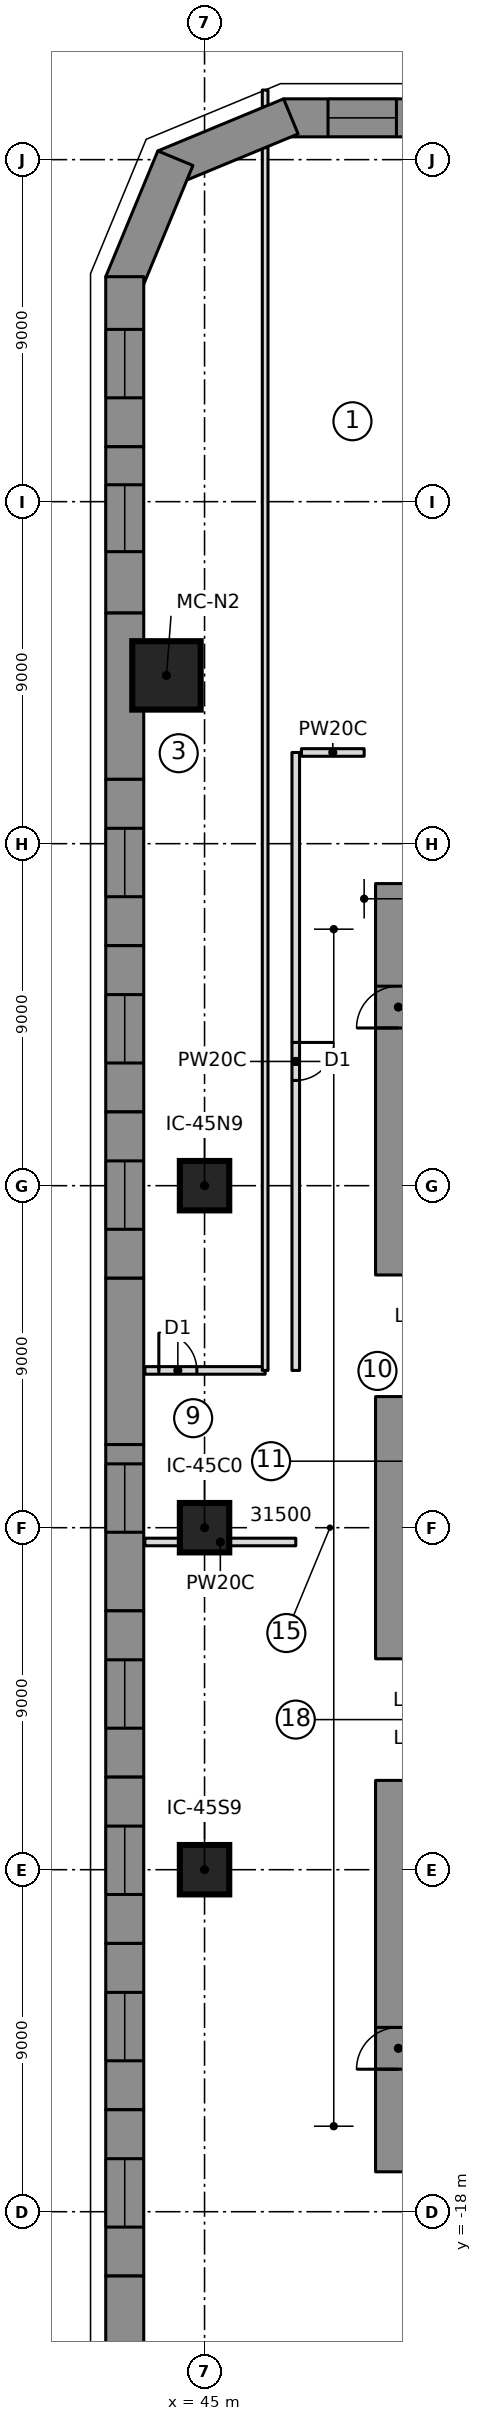
"""IFC4 building model, lengths in metres.
Left out: names, types, materials, properties, quantities, classifications, styles, units other than length and angle.
Written with IfcOpenShell. Run it as: python <this file> out.ifc"""

import sys

from ifc_helpers import new_model, si_unit, direction, frame, frame_2d, origin, origin_2d, place, context, subcontext, project, spatial, polyline, rectangle, outline, extrude, element, fill, save


model = new_model("IFC4")
c1 = context("Model", 3, precision=1e-05, world=origin(), true_north=direction((0.0, 1.0)))
c2 = subcontext(c1, "Body", "Model", "MODEL_VIEW")
j1 = project(units=[si_unit("LENGTHUNIT", "METRE"), si_unit("PLANEANGLEUNIT", "RADIAN")], contexts=[c1])
p1 = place(None, origin())
s1 = spatial("IfcSite", under=j1, at=p1, CompositionType="ELEMENT")
p2 = place(p1, origin())
s2 = spatial("IfcBuilding", under=s1, at=p2, CompositionType="ELEMENT")
p3 = place(p2, frame((0.0, 0.0, 19.0)))
s3 = spatial("IfcBuildingStorey", under=s2, at=p3, CompositionType="ELEMENT", Elevation=19.0)
p4 = place(p3, frame((50.1, 6.65, 0.0), z_axis=(0.0, 0.0, 1.0), x_axis=(0.0, 1.0, 0.0)))
e1 = element("IfcWall", 1, at=p4, inside=s3, PredefinedType="SHEAR", context=c2, shape_type="SweptSolid", body=[
    extrude(rectangle(XDim=10.3, YDim=1.2, at=frame_2d((5.15, 0.0))), origin(), (0.0, 0.0, 1.0), 5.0),
])
p5 = place(p4, frame((6.5, 0.0, 0.0)))
e2 = element("IfcOpeningElement", 2, at=p5, cuts=e1, PredefinedType="OPENING", context=c2, shape_type="SweptSolid", body=[
    extrude(rectangle(XDim=1.1, YDim=2.1, at=frame_2d((0.55, 1.05))), frame((0.0, 0.61, 0.0), z_axis=(0.0, -1.0, 0.0), x_axis=(1.0, 0.0, 0.0)), (0.0, 0.0, 1.0), 1.22),
])
p6 = place(p3, frame((50.1, -3.45, 0.0), z_axis=(0.0, 0.0, 1.0), x_axis=(0.0, 1.0, 0.0)))
e3 = element("IfcWall", 3, at=p6, inside=s3, PredefinedType="SHEAR", context=c2, shape_type="SweptSolid", body=[
    extrude(rectangle(XDim=6.9, YDim=1.2, at=frame_2d((3.45, 0.0))), origin(), (0.0, 0.0, 1.0), 5.0),
])
p7 = place(p3, frame((50.1, -16.95, 0.0), z_axis=(0.0, 0.0, 1.0), x_axis=(0.0, 1.0, 0.0)))
e4 = element("IfcWall", 4, at=p7, inside=s3, PredefinedType="SHEAR", context=c2, shape_type="SweptSolid", body=[
    extrude(rectangle(XDim=10.3, YDim=1.2, at=frame_2d((5.15, 0.0))), origin(), (0.0, 0.0, 1.0), 5.0),
])
p8 = place(p7, frame((2.7, 0.0, 0.0)))
e5 = element("IfcOpeningElement", 5, at=p8, cuts=e4, PredefinedType="OPENING", context=c2, shape_type="SweptSolid", body=[
    extrude(rectangle(XDim=1.1, YDim=2.1, at=frame_2d((0.55, 1.05))), frame((0.0, 0.61, 0.0), z_axis=(0.0, -1.0, 0.0), x_axis=(1.0, 0.0, 0.0)), (0.0, 0.0, 1.0), 1.22),
])
p9 = place(p3, frame((43.998, 22.428, 0.0), z_axis=(0.0, 0.0, 1.0), x_axis=(1.0, 0.0, 0.0)))
e6 = element("IfcColumn", 6, at=p9, inside=s3, PredefinedType="COLUMN", context=c2, shape_type="SweptSolid", body=[
    extrude(rectangle(XDim=1.8, YDim=1.8, at=origin_2d()), origin(), (0.0, 0.0, 1.0), 5.0),
])
for number, where, z_axis, x_axis in (
    (7, (45.0, -9.0, 0.0), (0.0, 0.0, 1.0), (1.0, 0.0, 0.0)),
    (8, (45.0, 0.0, 0.0), (0.0, 0.0, 1.0), (1.0, 0.0, 0.0)),
    (9, (45.0, 9.0, 0.0), (0.0, 0.0, 1.0), (1.0, 0.0, 0.0)),
):
    element("IfcColumn", number, at=place(p3, frame(where, z_axis=z_axis, x_axis=x_axis)), inside=s3, PredefinedType="COLUMN", context=c2, shape_type="SweptSolid", body=[
        extrude(rectangle(XDim=1.3, YDim=1.3, at=origin_2d()), origin(), (0.0, 0.0, 1.0), 5.0),
    ])
p10 = place(p3, frame((51.119, 37.1, 0.0), z_axis=(0.0, 0.0, 1.0), x_axis=(-1.0, 0.0, 0.0)))
e10 = element("IfcWall", 10, at=p10, inside=s3, PredefinedType="NOTDEFINED", context=c2, shape_type="SweptSolid", body=[
    extrude(outline(polyline([(0.0, -0.5), (4.04, -0.5), (3.841, 0.5), (0.0, 0.5), (0.0, -0.5)])), origin(), (0.0, 0.0, 1.0), 4.7),
])
p11 = place(p10, frame((1.07, 0.0, 0.9)))
e11 = element("IfcOpeningElement", 11, at=p11, cuts=e10, PredefinedType="OPENING", context=c2, shape_type="SweptSolid", body=[
    extrude(rectangle(XDim=1.8, YDim=2.4, at=frame_2d((0.9, 1.2))), frame((0.0, 0.51, 0.0), z_axis=(0.0, -1.0, 0.0), x_axis=(1.0, 0.0, 0.0)), (0.0, 0.0, 1.0), 1.02),
])
p12 = place(p3, frame((47.179, 37.1, 0.0), z_axis=(0.0, 0.0, 1.0), x_axis=(-0.923862365102, -0.382724875529, 0.0)))
e12 = element("IfcWall", 12, at=p12, inside=s3, PredefinedType="NOTDEFINED", context=c2, shape_type="SweptSolid", body=[
    extrude(outline(polyline([(-0.1, -0.5), (3.482, -0.5), (3.068, 0.5), (0.1, 0.5), (-0.1, -0.5)])), origin(), (0.0, 0.0, 1.0), 4.7),
])
p13 = place(p3, frame((44.153, 35.847, 0.0), z_axis=(0.0, 0.0, 1.0), x_axis=(-0.382724875529, -0.923862365102, 0.0)))
e13 = element("IfcWall", 13, at=p13, inside=s3, PredefinedType="NOTDEFINED", context=c2, shape_type="SweptSolid", body=[
    extrude(outline(polyline([(-0.207, -0.5), (3.375, -0.5), (3.175, 0.5), (0.207, 0.5), (-0.207, -0.5)])), origin(), (0.0, 0.0, 1.0), 4.7),
])
p14 = place(p3, frame((42.9, 32.821, 0.0), z_axis=(0.0, 0.0, 1.0), x_axis=(0.0, -1.0, 0.0)))
e14 = element("IfcWall", 14, at=p14, inside=s3, PredefinedType="NOTDEFINED", context=c2, shape_type="SweptSolid", body=[
    extrude(outline(polyline([(-0.1, -0.5), (4.376, -0.5), (4.376, 0.5), (0.1, 0.5), (-0.1, -0.5)])), origin(), (0.0, 0.0, 1.0), 4.7),
])
p15 = place(p14, frame((1.288, 0.0, 0.9)))
e15 = element("IfcOpeningElement", 15, at=p15, cuts=e14, PredefinedType="OPENING", context=c2, shape_type="SweptSolid", body=[
    extrude(rectangle(XDim=1.8, YDim=2.4, at=frame_2d((0.9, 1.2))), frame((0.0, 0.51, 0.0), z_axis=(0.0, -1.0, 0.0), x_axis=(1.0, 0.0, 0.0)), (0.0, 0.0, 1.0), 1.02),
])
p16 = place(p3, frame((42.9, 28.445, 0.0), z_axis=(0.0, 0.0, 1.0), x_axis=(0.0, -1.0, 0.0)))
e16 = element("IfcWall", 16, at=p16, inside=s3, PredefinedType="NOTDEFINED", context=c2, shape_type="SweptSolid", body=[
    extrude(outline(polyline([(0.0, -0.5), (4.376, -0.5), (4.376, 0.5), (0.0, 0.5), (0.0, -0.5)])), origin(), (0.0, 0.0, 1.0), 4.7),
])
p17 = place(p16, frame((1.0, 0.0, 0.9)))
e17 = element("IfcOpeningElement", 17, at=p17, cuts=e16, PredefinedType="OPENING", context=c2, shape_type="SweptSolid", body=[
    extrude(rectangle(XDim=1.76, YDim=2.4, at=frame_2d((0.88, 1.2))), frame((0.0, 0.51, 0.0), z_axis=(0.0, -1.0, 0.0), x_axis=(1.0, 0.0, 0.0)), (0.0, 0.0, 1.0), 1.02),
])
p18 = place(p3, frame((42.9, 24.069, 0.0), z_axis=(0.0, 0.0, 1.0), x_axis=(0.0, -1.0, 0.0)))
e18 = element("IfcWall", 18, at=p18, inside=s3, PredefinedType="NOTDEFINED", context=c2, shape_type="SweptSolid", body=[
    extrude(outline(polyline([(0.0, -0.5), (4.376, -0.5), (4.376, 0.5), (0.0, 0.5), (0.0, -0.5)])), origin(), (0.0, 0.0, 1.0), 4.7),
])
p19 = place(p3, frame((42.9, 19.693, 0.0), z_axis=(0.0, 0.0, 1.0), x_axis=(0.0, -1.0, 0.0)))
e19 = element("IfcWall", 19, at=p19, inside=s3, PredefinedType="NOTDEFINED", context=c2, shape_type="SweptSolid", body=[
    extrude(outline(polyline([(0.0, -0.5), (4.376, -0.5), (4.376, 0.5), (0.0, 0.5), (0.0, -0.5)])), origin(), (0.0, 0.0, 1.0), 4.7),
])
p20 = place(p19, frame((1.288, 0.0, 0.9)))
e20 = element("IfcOpeningElement", 20, at=p20, cuts=e19, PredefinedType="OPENING", context=c2, shape_type="SweptSolid", body=[
    extrude(rectangle(XDim=1.8, YDim=2.4, at=frame_2d((0.9, 1.2))), frame((0.0, 0.51, 0.0), z_axis=(0.0, -1.0, 0.0), x_axis=(1.0, 0.0, 0.0)), (0.0, 0.0, 1.0), 1.02),
])
p21 = place(p3, frame((42.9, 15.316, 0.0), z_axis=(0.0, 0.0, 1.0), x_axis=(0.0, -1.0, 0.0)))
e21 = element("IfcWall", 21, at=p21, inside=s3, PredefinedType="NOTDEFINED", context=c2, shape_type="SweptSolid", body=[
    extrude(outline(polyline([(0.0, -0.5), (4.376, -0.5), (4.376, 0.5), (0.0, 0.5), (0.0, -0.5)])), origin(), (0.0, 0.0, 1.0), 4.7),
])
p22 = place(p21, frame((1.288, 0.0, 0.9)))
e22 = element("IfcOpeningElement", 22, at=p22, cuts=e21, PredefinedType="OPENING", context=c2, shape_type="SweptSolid", body=[
    extrude(rectangle(XDim=1.8, YDim=2.4, at=frame_2d((0.9, 1.2))), frame((0.0, 0.51, 0.0), z_axis=(0.0, -1.0, 0.0), x_axis=(1.0, 0.0, 0.0)), (0.0, 0.0, 1.0), 1.02),
])
p23 = place(p3, frame((42.9, 10.94, 0.0), z_axis=(0.0, 0.0, 1.0), x_axis=(0.0, -1.0, 0.0)))
e23 = element("IfcWall", 23, at=p23, inside=s3, PredefinedType="NOTDEFINED", context=c2, shape_type="SweptSolid", body=[
    extrude(outline(polyline([(0.0, -0.5), (4.376, -0.5), (4.376, 0.5), (0.0, 0.5), (0.0, -0.5)])), origin(), (0.0, 0.0, 1.0), 4.7),
])
p24 = place(p23, frame((1.288, 0.0, 0.9)))
e24 = element("IfcOpeningElement", 24, at=p24, cuts=e23, PredefinedType="OPENING", context=c2, shape_type="SweptSolid", body=[
    extrude(rectangle(XDim=1.8, YDim=2.4, at=frame_2d((0.9, 1.2))), frame((0.0, 0.51, 0.0), z_axis=(0.0, -1.0, 0.0), x_axis=(1.0, 0.0, 0.0)), (0.0, 0.0, 1.0), 1.02),
])
p25 = place(p3, frame((42.9, 6.564, 0.0), z_axis=(0.0, 0.0, 1.0), x_axis=(0.0, -1.0, 0.0)))
e25 = element("IfcWall", 25, at=p25, inside=s3, PredefinedType="NOTDEFINED", context=c2, shape_type="SweptSolid", body=[
    extrude(outline(polyline([(0.0, -0.5), (4.376, -0.5), (4.376, 0.5), (0.0, 0.5), (0.0, -0.5)])), origin(), (0.0, 0.0, 1.0), 4.7),
])
p26 = place(p3, frame((42.9, 2.188, 0.0), z_axis=(0.0, 0.0, 1.0), x_axis=(0.0, -1.0, 0.0)))
e26 = element("IfcWall", 26, at=p26, inside=s3, PredefinedType="NOTDEFINED", context=c2, shape_type="SweptSolid", body=[
    extrude(outline(polyline([(0.0, -0.5), (4.376, -0.5), (4.376, 0.5), (0.0, 0.5), (0.0, -0.5)])), origin(), (0.0, 0.0, 1.0), 4.7),
])
p27 = place(p26, frame((0.508, 0.0, 0.9)))
e27 = element("IfcOpeningElement", 27, at=p27, cuts=e26, PredefinedType="OPENING", context=c2, shape_type="SweptSolid", body=[
    extrude(rectangle(XDim=1.8, YDim=2.4, at=frame_2d((0.9, 1.2))), frame((0.0, 0.51, 0.0), z_axis=(0.0, -1.0, 0.0), x_axis=(1.0, 0.0, 0.0)), (0.0, 0.0, 1.0), 1.02),
])
p28 = place(p3, frame((42.9, -2.188, 0.0), z_axis=(0.0, 0.0, 1.0), x_axis=(0.0, -1.0, 0.0)))
e28 = element("IfcWall", 28, at=p28, inside=s3, PredefinedType="NOTDEFINED", context=c2, shape_type="SweptSolid", body=[
    extrude(outline(polyline([(0.0, -0.5), (4.376, -0.5), (4.376, 0.5), (0.0, 0.5), (0.0, -0.5)])), origin(), (0.0, 0.0, 1.0), 4.7),
])
p29 = place(p28, frame((1.288, 0.0, 0.9)))
e29 = element("IfcOpeningElement", 29, at=p29, cuts=e28, PredefinedType="OPENING", context=c2, shape_type="SweptSolid", body=[
    extrude(rectangle(XDim=1.8, YDim=2.4, at=frame_2d((0.9, 1.2))), frame((0.0, 0.51, 0.0), z_axis=(0.0, -1.0, 0.0), x_axis=(1.0, 0.0, 0.0)), (0.0, 0.0, 1.0), 1.02),
])
p30 = place(p3, frame((42.9, -6.564, 0.0), z_axis=(0.0, 0.0, 1.0), x_axis=(0.0, -1.0, 0.0)))
e30 = element("IfcWall", 30, at=p30, inside=s3, PredefinedType="NOTDEFINED", context=c2, shape_type="SweptSolid", body=[
    extrude(outline(polyline([(0.0, -0.5), (4.376, -0.5), (4.376, 0.5), (0.0, 0.5), (0.0, -0.5)])), origin(), (0.0, 0.0, 1.0), 4.7),
])
p31 = place(p30, frame((1.288, 0.0, 0.9)))
e31 = element("IfcOpeningElement", 31, at=p31, cuts=e30, PredefinedType="OPENING", context=c2, shape_type="SweptSolid", body=[
    extrude(rectangle(XDim=1.8, YDim=2.4, at=frame_2d((0.9, 1.2))), frame((0.0, 0.51, 0.0), z_axis=(0.0, -1.0, 0.0), x_axis=(1.0, 0.0, 0.0)), (0.0, 0.0, 1.0), 1.02),
])
p32 = place(p3, frame((42.9, -10.94, 0.0), z_axis=(0.0, 0.0, 1.0), x_axis=(0.0, -1.0, 0.0)))
e32 = element("IfcWall", 32, at=p32, inside=s3, PredefinedType="NOTDEFINED", context=c2, shape_type="SweptSolid", body=[
    extrude(outline(polyline([(0.0, -0.5), (4.376, -0.5), (4.376, 0.5), (0.0, 0.5), (0.0, -0.5)])), origin(), (0.0, 0.0, 1.0), 4.7),
])
p33 = place(p32, frame((1.288, 0.0, 0.9)))
e33 = element("IfcOpeningElement", 33, at=p33, cuts=e32, PredefinedType="OPENING", context=c2, shape_type="SweptSolid", body=[
    extrude(rectangle(XDim=1.8, YDim=2.4, at=frame_2d((0.9, 1.2))), frame((0.0, 0.51, 0.0), z_axis=(0.0, -1.0, 0.0), x_axis=(1.0, 0.0, 0.0)), (0.0, 0.0, 1.0), 1.02),
])
p34 = place(p3, frame((42.9, -15.316, 0.0), z_axis=(0.0, 0.0, 1.0), x_axis=(0.0, -1.0, 0.0)))
e34 = element("IfcWall", 34, at=p34, inside=s3, PredefinedType="NOTDEFINED", context=c2, shape_type="SweptSolid", body=[
    extrude(outline(polyline([(0.0, -0.5), (4.376, -0.5), (4.376, 0.5), (0.0, 0.5), (0.0, -0.5)])), origin(), (0.0, 0.0, 1.0), 4.7),
])
p35 = place(p34, frame((1.288, 0.0, 0.9)))
e35 = element("IfcOpeningElement", 35, at=p35, cuts=e34, PredefinedType="OPENING", context=c2, shape_type="SweptSolid", body=[
    extrude(rectangle(XDim=1.8, YDim=2.4, at=frame_2d((0.9, 1.2))), frame((0.0, 0.51, 0.0), z_axis=(0.0, -1.0, 0.0), x_axis=(1.0, 0.0, 0.0)), (0.0, 0.0, 1.0), 1.02),
])
p36 = place(p3, frame((42.9, -19.693, 0.0), z_axis=(0.0, 0.0, 1.0), x_axis=(0.0, -1.0, 0.0)))
e36 = element("IfcWall", 36, at=p36, inside=s3, PredefinedType="NOTDEFINED", context=c2, shape_type="SweptSolid", body=[
    extrude(outline(polyline([(0.0, -0.5), (4.376, -0.5), (4.376, 0.5), (0.0, 0.5), (0.0, -0.5)])), origin(), (0.0, 0.0, 1.0), 4.7),
])
p37 = place(p3, frame((43.43, -0.376, 0.0), z_axis=(0.0, 0.0, 1.0), x_axis=(1.0, 0.0, 0.0)))
e37 = element("IfcWall", 37, at=p37, inside=s3, PredefinedType="PARTITIONING", context=c2, shape_type="SweptSolid", body=[
    extrude(rectangle(XDim=3.971, YDim=0.2, at=frame_2d((1.985, 0.0))), origin(), (0.0, 0.0, 1.0), 4.65),
])
p38 = place(p3, frame((43.43, 4.139, 0.0), z_axis=(0.0, 0.0, 1.0), x_axis=(1.0, 0.0, 0.0)))
e38 = element("IfcWall", 38, at=p38, inside=s3, PredefinedType="PARTITIONING", context=c2, shape_type="SweptSolid", body=[
    extrude(rectangle(XDim=3.165, YDim=0.2, at=frame_2d((1.582, 0.0))), origin(), (0.0, 0.0, 1.0), 4.65),
])
p39 = place(p38, frame((0.367, 0.0, 0.0)))
e39 = element("IfcOpeningElement", 39, at=p39, cuts=e38, PredefinedType="OPENING", context=c2, shape_type="SweptSolid", body=[
    extrude(rectangle(XDim=1.0, YDim=2.1, at=frame_2d((0.5, 1.05))), frame((0.0, 0.11, 0.0), z_axis=(0.0, -1.0, 0.0), x_axis=(1.0, 0.0, 0.0)), (0.0, 0.0, 1.0), 0.22),
])
p40 = place(p3, frame((46.594, 4.139, 0.0), z_axis=(0.0, 0.0, 1.0), x_axis=(0.0, 1.0, 0.0)))
e40 = element("IfcWall", 40, at=p40, inside=s3, PredefinedType="PARTITIONING", context=c2, shape_type="SweptSolid", body=[
    extrude(rectangle(XDim=32.178, YDim=0.15, at=frame_2d((16.089, 0.0))), origin(), (0.0, 0.0, 1.0), 4.65),
])
p41 = place(p3, frame((46.594, 37.399, 0.0), z_axis=(0.0, 0.0, 1.0), x_axis=(0.0, 1.0, 0.0)))
e41 = element("IfcWall", 41, at=p41, inside=s3, PredefinedType="PARTITIONING", context=c2, shape_type="SweptSolid", body=[
    extrude(rectangle(XDim=0.433, YDim=0.15, at=frame_2d((0.216, 0.0))), origin(), (0.0, 0.0, 1.0), 4.65),
])
p42 = place(p3, frame((47.4, 20.4, 0.0), z_axis=(0.0, 0.0, 1.0), x_axis=(0.0, -1.0, 0.0)))
e42 = element("IfcWall", 42, at=p42, inside=s3, PredefinedType="PARTITIONING", context=c2, shape_type="SweptSolid", body=[
    extrude(rectangle(XDim=16.261, YDim=0.2, at=frame_2d((8.131, 0.0))), origin(), (0.0, 0.0, 1.0), 4.65),
])
p43 = place(p42, frame((7.631, 0.0, 0.0)))
e43 = element("IfcOpeningElement", 43, at=p43, cuts=e42, PredefinedType="OPENING", context=c2, shape_type="SweptSolid", body=[
    extrude(rectangle(XDim=1.0, YDim=2.1, at=frame_2d((0.5, 1.05))), frame((0.0, 0.11, 0.0), z_axis=(0.0, -1.0, 0.0), x_axis=(1.0, 0.0, 0.0)), (0.0, 0.0, 1.0), 0.22),
])
p44 = place(p3, frame((47.55, 20.4, 0.0), z_axis=(0.0, 0.0, 1.0), x_axis=(1.0, 0.0, 0.0)))
e44 = element("IfcWall", 44, at=p44, inside=s3, PredefinedType="PARTITIONING", context=c2, shape_type="SweptSolid", body=[
    extrude(rectangle(XDim=1.65, YDim=0.2, at=frame_2d((0.825, 0.0))), origin(), (0.0, 0.0, 1.0), 4.65),
])
p45 = place(p11, origin())
e45 = element("IfcWindow", 45, at=p45, inside=s3, PartitioningType="SINGLE_PANEL", PredefinedType="WINDOW", context=c2, shape_type="SweptSolid", body=[
    extrude(rectangle(XDim=1.8, YDim=2.4, at=frame_2d((0.9, 1.2))), frame((0.0, 0.5, 0.0), z_axis=(0.0, -1.0, 0.0), x_axis=(1.0, 0.0, 0.0)), (0.0, 0.0, 1.0), 0.06),
])
fill(e11, e45)
p46 = place(p15, origin())
e46 = element("IfcWindow", 46, at=p46, inside=s3, PartitioningType="SINGLE_PANEL", PredefinedType="WINDOW", context=c2, shape_type="SweptSolid", body=[
    extrude(rectangle(XDim=1.8, YDim=2.4, at=frame_2d((0.9, 1.2))), frame((0.0, 0.5, 0.0), z_axis=(0.0, -1.0, 0.0), x_axis=(1.0, 0.0, 0.0)), (0.0, 0.0, 1.0), 0.06),
])
fill(e15, e46)
p47 = place(p17, origin())
e47 = element("IfcWindow", 47, at=p47, inside=s3, PartitioningType="SINGLE_PANEL", PredefinedType="WINDOW", context=c2, shape_type="SweptSolid", body=[
    extrude(rectangle(XDim=1.76, YDim=2.4, at=frame_2d((0.88, 1.2))), frame((0.0, 0.5, 0.0), z_axis=(0.0, -1.0, 0.0), x_axis=(1.0, 0.0, 0.0)), (0.0, 0.0, 1.0), 0.06),
])
fill(e17, e47)
p48 = place(p20, origin())
e48 = element("IfcWindow", 48, at=p48, inside=s3, PartitioningType="SINGLE_PANEL", PredefinedType="WINDOW", context=c2, shape_type="SweptSolid", body=[
    extrude(rectangle(XDim=1.8, YDim=2.4, at=frame_2d((0.9, 1.2))), frame((0.0, 0.5, 0.0), z_axis=(0.0, -1.0, 0.0), x_axis=(1.0, 0.0, 0.0)), (0.0, 0.0, 1.0), 0.06),
])
fill(e20, e48)
p49 = place(p22, origin())
e49 = element("IfcWindow", 49, at=p49, inside=s3, PartitioningType="SINGLE_PANEL", PredefinedType="WINDOW", context=c2, shape_type="SweptSolid", body=[
    extrude(rectangle(XDim=1.8, YDim=2.4, at=frame_2d((0.9, 1.2))), frame((0.0, 0.5, 0.0), z_axis=(0.0, -1.0, 0.0), x_axis=(1.0, 0.0, 0.0)), (0.0, 0.0, 1.0), 0.06),
])
fill(e22, e49)
p50 = place(p24, origin())
e50 = element("IfcWindow", 50, at=p50, inside=s3, PartitioningType="SINGLE_PANEL", PredefinedType="WINDOW", context=c2, shape_type="SweptSolid", body=[
    extrude(rectangle(XDim=1.8, YDim=2.4, at=frame_2d((0.9, 1.2))), frame((0.0, 0.5, 0.0), z_axis=(0.0, -1.0, 0.0), x_axis=(1.0, 0.0, 0.0)), (0.0, 0.0, 1.0), 0.06),
])
fill(e24, e50)
p51 = place(p27, origin())
e51 = element("IfcWindow", 51, at=p51, inside=s3, PartitioningType="SINGLE_PANEL", PredefinedType="WINDOW", context=c2, shape_type="SweptSolid", body=[
    extrude(rectangle(XDim=1.8, YDim=2.4, at=frame_2d((0.9, 1.2))), frame((0.0, 0.5, 0.0), z_axis=(0.0, -1.0, 0.0), x_axis=(1.0, 0.0, 0.0)), (0.0, 0.0, 1.0), 0.06),
])
fill(e27, e51)
p52 = place(p29, origin())
e52 = element("IfcWindow", 52, at=p52, inside=s3, PartitioningType="SINGLE_PANEL", PredefinedType="WINDOW", context=c2, shape_type="SweptSolid", body=[
    extrude(rectangle(XDim=1.8, YDim=2.4, at=frame_2d((0.9, 1.2))), frame((0.0, 0.5, 0.0), z_axis=(0.0, -1.0, 0.0), x_axis=(1.0, 0.0, 0.0)), (0.0, 0.0, 1.0), 0.06),
])
fill(e29, e52)
p53 = place(p31, origin())
e53 = element("IfcWindow", 53, at=p53, inside=s3, PartitioningType="SINGLE_PANEL", PredefinedType="WINDOW", context=c2, shape_type="SweptSolid", body=[
    extrude(rectangle(XDim=1.8, YDim=2.4, at=frame_2d((0.9, 1.2))), frame((0.0, 0.5, 0.0), z_axis=(0.0, -1.0, 0.0), x_axis=(1.0, 0.0, 0.0)), (0.0, 0.0, 1.0), 0.06),
])
fill(e31, e53)
p54 = place(p33, origin())
e54 = element("IfcWindow", 54, at=p54, inside=s3, PartitioningType="SINGLE_PANEL", PredefinedType="WINDOW", context=c2, shape_type="SweptSolid", body=[
    extrude(rectangle(XDim=1.8, YDim=2.4, at=frame_2d((0.9, 1.2))), frame((0.0, 0.5, 0.0), z_axis=(0.0, -1.0, 0.0), x_axis=(1.0, 0.0, 0.0)), (0.0, 0.0, 1.0), 0.06),
])
fill(e33, e54)
p55 = place(p35, origin())
e55 = element("IfcWindow", 55, at=p55, inside=s3, PartitioningType="SINGLE_PANEL", PredefinedType="WINDOW", context=c2, shape_type="SweptSolid", body=[
    extrude(rectangle(XDim=1.8, YDim=2.4, at=frame_2d((0.9, 1.2))), frame((0.0, 0.5, 0.0), z_axis=(0.0, -1.0, 0.0), x_axis=(1.0, 0.0, 0.0)), (0.0, 0.0, 1.0), 0.06),
])
fill(e35, e55)
p56 = place(p39, origin())
e56 = element("IfcDoor", 56, at=p56, inside=s3, OperationType="SINGLE_SWING_LEFT", PredefinedType="DOOR", context=c2, shape_type="SweptSolid", body=[
    extrude(rectangle(XDim=1.0, YDim=2.1, at=frame_2d((0.5, 1.05))), frame((0.0, 0.025, 0.0), z_axis=(0.0, -1.0, 0.0), x_axis=(1.0, 0.0, 0.0)), (0.0, 0.0, 1.0), 0.05),
])
fill(e39, e56)
p57 = place(p43, origin())
e57 = element("IfcDoor", 57, at=p57, inside=s3, OperationType="SINGLE_SWING_LEFT", PredefinedType="DOOR", context=c2, shape_type="SweptSolid", body=[
    extrude(rectangle(XDim=1.0, YDim=2.1, at=frame_2d((0.5, 1.05))), frame((0.0, 0.025, 0.0), z_axis=(0.0, -1.0, 0.0), x_axis=(1.0, 0.0, 0.0)), (0.0, 0.0, 1.0), 0.05),
])
fill(e43, e57)
p58 = place(p5, origin())
e58 = element("IfcDoor", 58, at=p58, inside=s3, OperationType="SINGLE_SWING_RIGHT", PredefinedType="DOOR", context=c2, shape_type="SweptSolid", body=[
    extrude(rectangle(XDim=1.1, YDim=2.1, at=frame_2d((0.55, 1.05))), frame((0.0, 0.025, 0.0), z_axis=(0.0, -1.0, 0.0), x_axis=(1.0, 0.0, 0.0)), (0.0, 0.0, 1.0), 0.05),
])
fill(e2, e58)
p59 = place(p8, origin())
e59 = element("IfcDoor", 59, at=p59, inside=s3, OperationType="SINGLE_SWING_RIGHT", PredefinedType="DOOR", context=c2, shape_type="SweptSolid", body=[
    extrude(rectangle(XDim=1.1, YDim=2.1, at=frame_2d((0.55, 1.05))), frame((0.0, 0.025, 0.0), z_axis=(0.0, -1.0, 0.0), x_axis=(1.0, 0.0, 0.0)), (0.0, 0.0, 1.0), 0.05),
])
fill(e5, e59)
save(model, sys.argv[1])
